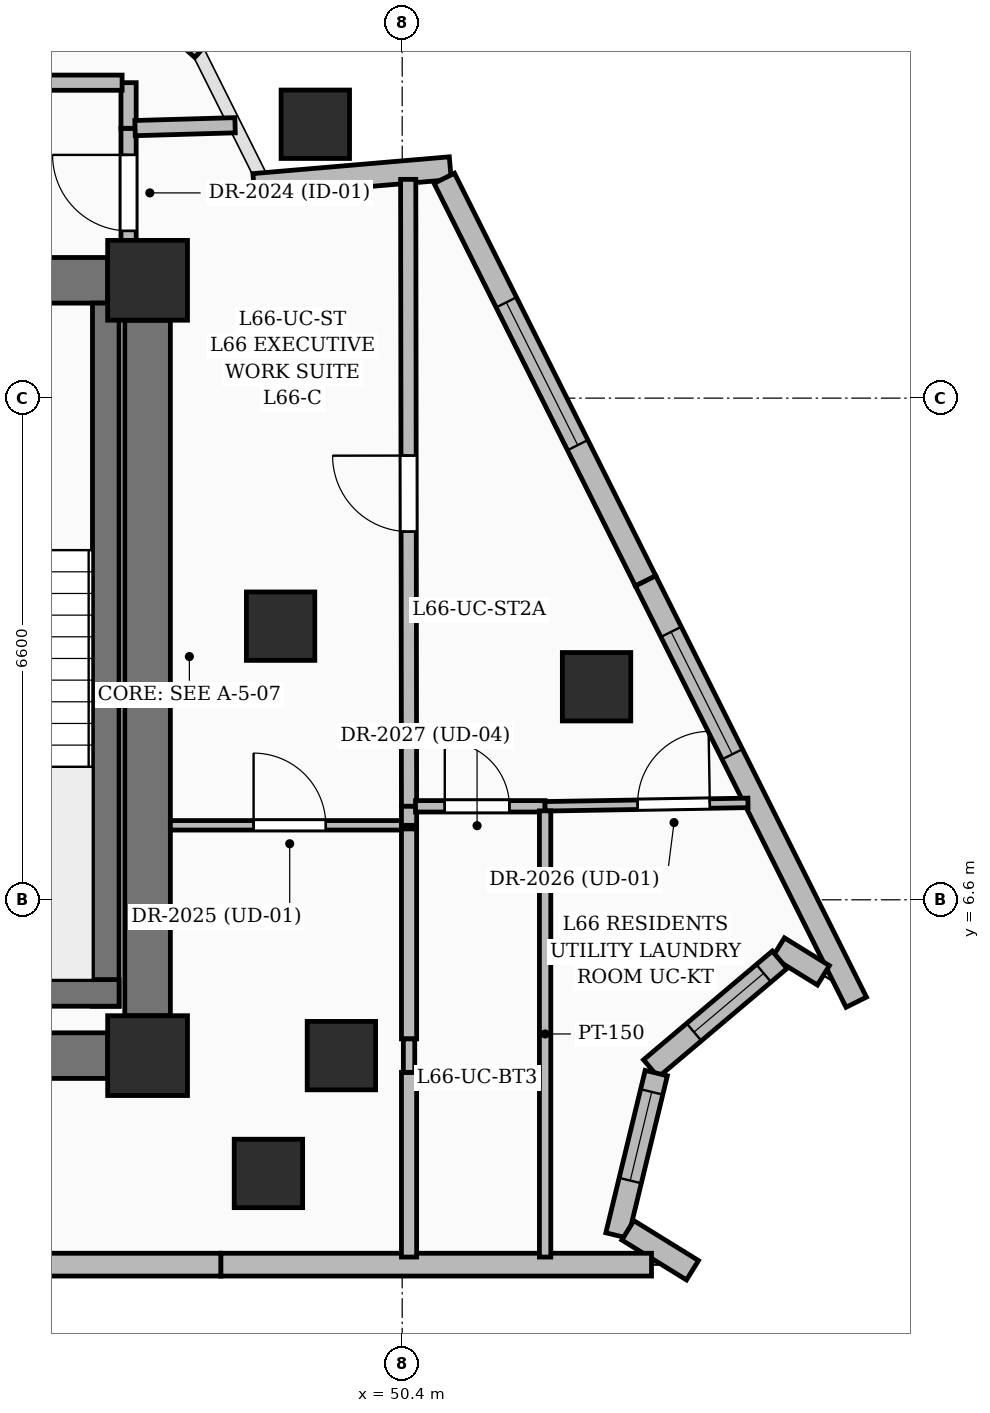
"""IFC4 building model, lengths in metres.
Left out: names, types, materials, properties, quantities, classifications, styles, units other than length and angle.
Written with IfcOpenShell. Run it as: python <this file> out.ifc"""

import sys

from ifc_helpers import new_model, si_unit, direction, frame, frame_2d, origin, origin_2d, place, context, subcontext, project, spatial, rectangle, extrude, element, fill, save


model = new_model("IFC4")
c1 = context("Model", 3, precision=1e-05, world=origin(), true_north=direction((0.0, 1.0)))
c2 = subcontext(c1, "Body", "Model", "MODEL_VIEW")
j1 = project(units=[si_unit("LENGTHUNIT", "METRE"), si_unit("PLANEANGLEUNIT", "RADIAN")], contexts=[c1])
p1 = place(None, origin())
s1 = spatial("IfcSite", under=j1, at=p1, CompositionType="ELEMENT")
p2 = place(p1, origin())
s2 = spatial("IfcBuilding", under=s1, at=p2, CompositionType="ELEMENT")
p3 = place(p2, frame((0.0, 0.0, 255.75)))
s3 = spatial("IfcBuildingStorey", under=s2, at=p3, CompositionType="ELEMENT", Elevation=255.75)
for number, where, z_axis, x_axis in (
    (1, (47.05, 4.55, 0.0), (0.0, 0.0, 1.0), (1.0, 0.0, 0.0)),
    (2, (47.05, 14.75, 0.0), (0.0, 0.0, 1.0), (1.0, 0.0, 0.0)),
):
    element("IfcColumn", number, at=place(p3, frame(where, z_axis=z_axis, x_axis=x_axis)), inside=s3, PredefinedType="COLUMN", context=c2, shape_type="SweptSolid", body=[
        extrude(rectangle(XDim=1.05, YDim=1.05, at=origin_2d()), origin(), (0.0, 0.0, 1.0), 3.75),
    ])
for number, where, z_axis, x_axis in (
    (3, (49.6, 4.55, 0.0), (0.0, 0.0, 1.0), (1.0, 0.0, 0.0)),
    (4, (48.8, 10.2, 0.0), (0.0, 0.0, 1.0), (1.0, 0.0, 0.0)),
):
    element("IfcColumn", number, at=place(p3, frame(where, z_axis=z_axis, x_axis=x_axis)), inside=s3, PredefinedType="COLUMN", context=c2, shape_type="SweptSolid", body=[
        extrude(rectangle(XDim=0.9, YDim=0.9, at=origin_2d()), origin(), (0.0, 0.0, 1.0), 3.75),
    ])
p4 = place(p3, frame((35.675, 4.55, 0.0), z_axis=(0.0, 0.0, 1.0), x_axis=(1.0, 0.0, 0.0)))
e5 = element("IfcWall", 5, at=p4, inside=s3, PredefinedType="SHEAR", context=c2, shape_type="SweptSolid", body=[
    extrude(rectangle(XDim=10.85, YDim=0.6, at=frame_2d((5.425, 0.0))), origin(), (0.0, 0.0, 1.0), 3.75),
])
p5 = place(p3, frame((35.675, 14.75, 0.0), z_axis=(0.0, 0.0, 1.0), x_axis=(1.0, 0.0, 0.0)))
e6 = element("IfcWall", 6, at=p5, inside=s3, PredefinedType="SHEAR", context=c2, shape_type="SweptSolid", body=[
    extrude(rectangle(XDim=10.85, YDim=0.6, at=frame_2d((5.425, 0.0))), origin(), (0.0, 0.0, 1.0), 3.75),
])
p6 = place(p5, frame((1.1, 0.0, 0.0)))
e7 = element("IfcOpeningElement", 7, at=p6, cuts=e6, PredefinedType="OPENING", context=c2, shape_type="SweptSolid", body=[
    extrude(rectangle(XDim=1.05, YDim=2.15, at=frame_2d((0.525, 1.075))), frame((0.0, 0.31, 0.0), z_axis=(0.0, -1.0, 0.0), x_axis=(1.0, 0.0, 0.0)), (0.0, 0.0, 1.0), 0.62),
])
p7 = place(p5, frame((8.7, 0.0, 0.0)))
e8 = element("IfcOpeningElement", 8, at=p7, cuts=e6, PredefinedType="OPENING", context=c2, shape_type="SweptSolid", body=[
    extrude(rectangle(XDim=1.05, YDim=2.15, at=frame_2d((0.525, 1.075))), frame((0.0, 0.31, 0.0), z_axis=(0.0, -1.0, 0.0), x_axis=(1.0, 0.0, 0.0)), (0.0, 0.0, 1.0), 0.62),
])
p8 = place(p5, frame((3.825, 0.0, 0.0)))
e9 = element("IfcOpeningElement", 9, at=p8, cuts=e6, PredefinedType="OPENING", context=c2, shape_type="SweptSolid", body=[
    extrude(rectangle(XDim=1.2, YDim=2.2, at=frame_2d((0.6, 1.1))), frame((0.0, 0.31, 0.0), z_axis=(0.0, -1.0, 0.0), x_axis=(1.0, 0.0, 0.0)), (0.0, 0.0, 1.0), 0.62),
])
p9 = place(p5, frame((5.825, 0.0, 0.0)))
e10 = element("IfcOpeningElement", 10, at=p9, cuts=e6, PredefinedType="OPENING", context=c2, shape_type="SweptSolid", body=[
    extrude(rectangle(XDim=1.2, YDim=2.2, at=frame_2d((0.6, 1.1))), frame((0.0, 0.31, 0.0), z_axis=(0.0, -1.0, 0.0), x_axis=(1.0, 0.0, 0.0)), (0.0, 0.0, 1.0), 0.62),
])
p10 = place(p3, frame((47.05, 5.075, 0.0), z_axis=(0.0, 0.0, 1.0), x_axis=(0.0, 1.0, 0.0)))
e11 = element("IfcWall", 11, at=p10, inside=s3, PredefinedType="SHEAR", context=c2, shape_type="SweptSolid", body=[
    extrude(rectangle(XDim=9.15, YDim=0.6, at=frame_2d((4.575, 0.0))), origin(), (0.0, 0.0, 1.0), 3.75),
])
p11 = place(p3, frame((46.5, 5.2, 0.0), z_axis=(0.0, 0.0, 1.0), x_axis=(0.0, 1.0, 0.0)))
e12 = element("IfcWall", 12, at=p11, inside=s3, PredefinedType="SOLIDWALL", context=c2, shape_type="SweptSolid", body=[
    extrude(rectangle(XDim=9.25, YDim=0.35, at=frame_2d((4.625, 0.0))), origin(), (0.0, 0.0, 1.0), 3.75),
])
p12 = place(p3, frame((43.125, 5.375, 0.0), z_axis=(0.0, 0.0, 1.0), x_axis=(1.0, 0.0, 0.0)))
e13 = element("IfcWall", 13, at=p12, inside=s3, PredefinedType="SOLIDWALL", context=c2, shape_type="SweptSolid", body=[
    extrude(rectangle(XDim=3.55, YDim=0.35, at=frame_2d((1.775, 0.0))), origin(), (0.0, 0.0, 1.0), 3.75),
])
for number, where, z_axis, x_axis in (
    (14, (48.64, 3.0, 0.0), (0.0, 0.0, 1.0), (1.0, 0.0, 0.0)),
    (15, (52.957, 9.403, 0.0), (0.0, 0.0, 1.0), (1.0, 0.0, 0.0)),
    (16, (49.257, 16.803, 0.0), (0.0, 0.0, 1.0), (1.0, 0.0, 0.0)),
):
    element("IfcColumn", number, at=place(p3, frame(where, z_axis=z_axis, x_axis=x_axis)), inside=s3, PredefinedType="COLUMN", context=c2, shape_type="SweptSolid", body=[
        extrude(rectangle(XDim=0.9, YDim=0.9, at=origin_2d()), origin(), (0.0, 0.0, 1.0), 3.75),
    ])
p13 = place(p3, frame((49.101, 19.508, 0.0), z_axis=(0.0, 0.0, 1.0), x_axis=(-0.665927695229, -0.746016289854, 0.0)))
e17 = element("IfcWall", 17, at=p13, inside=s3, PredefinedType="SOLIDWALL", context=c2, shape_type="SweptSolid", body=[
    extrude(rectangle(XDim=2.314, YDim=0.3, at=frame_2d((1.157, 0.0))), origin(), (0.0, 0.0, 1.0), 2.825),
])
p14 = place(p13, frame((0.788, 0.0, 0.8)))
e18 = element("IfcOpeningElement", 18, at=p14, cuts=e17, PredefinedType="OPENING", context=c2, shape_type="SweptSolid", body=[
    extrude(rectangle(XDim=1.2, YDim=1.8, at=frame_2d((0.6, 0.9))), frame((0.0, 0.16, 0.0), z_axis=(0.0, -1.0, 0.0), x_axis=(1.0, 0.0, 0.0)), (0.0, 0.0, 1.0), 0.32),
])
p15 = place(p3, frame((48.448, 16.004, 0.0), z_axis=(0.0, 0.0, 1.0), x_axis=(0.996372236954, 0.085102088266, 0.0)))
e19 = element("IfcWall", 19, at=p15, inside=s3, PredefinedType="SOLIDWALL", context=c2, shape_type="SweptSolid", body=[
    extrude(rectangle(XDim=2.594, YDim=0.3, at=frame_2d((1.297, 0.0))), origin(), (0.0, 0.0, 1.0), 2.769),
])
p16 = place(p3, frame((50.953, 16.092, 0.0), z_axis=(0.0, 0.0, 1.0), x_axis=(0.447246574942, -0.894410700519, 0.0)))
e20 = element("IfcWall", 20, at=p16, inside=s3, PredefinedType="SOLIDWALL", context=c2, shape_type="SweptSolid", body=[
    extrude(rectangle(XDim=5.922, YDim=0.3, at=frame_2d((2.961, 0.0))), origin(), (0.0, 0.0, 1.0), 3.5),
])
p17 = place(p16, frame((1.825, 0.0, 0.55)))
e21 = element("IfcOpeningElement", 21, at=p17, cuts=e20, PredefinedType="OPENING", context=c2, shape_type="SweptSolid", body=[
    extrude(rectangle(XDim=2.1, YDim=2.4, at=frame_2d((1.05, 1.2))), frame((0.0, 0.16, 0.0), z_axis=(0.0, -1.0, 0.0), x_axis=(1.0, 0.0, 0.0)), (0.0, 0.0, 1.0), 0.32),
])
p18 = place(p3, frame((53.602, 10.795, 0.0), z_axis=(0.0, 0.0, 1.0), x_axis=(0.447229354041, -0.894419311556, 0.0)))
e22 = element("IfcWall", 22, at=p18, inside=s3, PredefinedType="SOLIDWALL", context=c2, shape_type="SweptSolid", body=[
    extrude(rectangle(XDim=6.197, YDim=0.3, at=frame_2d((3.099, 0.0))), origin(), (0.0, 0.0, 1.0), 3.5),
])
p19 = place(p18, frame((0.75, 0.0, 0.6)))
e23 = element("IfcOpeningElement", 23, at=p19, cuts=e22, PredefinedType="OPENING", context=c2, shape_type="SweptSolid", body=[
    extrude(rectangle(XDim=1.8, YDim=2.1, at=frame_2d((0.9, 1.05))), frame((0.0, 0.16, 0.0), z_axis=(0.0, -1.0, 0.0), x_axis=(1.0, 0.0, 0.0)), (0.0, 0.0, 1.0), 0.32),
])
p20 = place(p3, frame((55.941, 5.607, 0.0), z_axis=(0.0, 0.0, 1.0), x_axis=(-0.850848828595, 0.525410573626, 0.0)))
e24 = element("IfcWall", 24, at=p20, inside=s3, PredefinedType="SOLIDWALL", context=c2, shape_type="SweptSolid", body=[
    extrude(rectangle(XDim=0.695, YDim=0.3, at=frame_2d((0.347, 0.0))), origin(), (0.0, 0.0, 1.0), 3.5),
])
p21 = place(p3, frame((55.366, 5.811, 0.0), z_axis=(0.0, 0.0, 1.0), x_axis=(-0.764070930708, -0.645132244464, 0.0)))
e25 = element("IfcWall", 25, at=p21, inside=s3, PredefinedType="SOLIDWALL", context=c2, shape_type="SweptSolid", body=[
    extrude(rectangle(XDim=2.217, YDim=0.3, at=frame_2d((1.108, 0.0))), origin(), (0.0, 0.0, 1.0), 3.5),
])
p22 = place(p21, frame((0.275, 0.0, 0.8)))
e26 = element("IfcOpeningElement", 26, at=p22, cuts=e25, PredefinedType="OPENING", context=c2, shape_type="SweptSolid", body=[
    extrude(rectangle(XDim=1.2, YDim=1.8, at=frame_2d((0.6, 0.9))), frame((0.0, 0.16, 0.0), z_axis=(0.0, -1.0, 0.0), x_axis=(1.0, 0.0, 0.0)), (0.0, 0.0, 1.0), 0.32),
])
p23 = place(p3, frame((53.742, 4.32, 0.0), z_axis=(0.0, 0.0, 1.0), x_axis=(-0.235342539944, -0.971912490347, 0.0)))
e27 = element("IfcWall", 27, at=p23, inside=s3, PredefinedType="SOLIDWALL", context=c2, shape_type="SweptSolid", body=[
    extrude(rectangle(XDim=2.198, YDim=0.3, at=frame_2d((1.099, 0.0))), origin(), (0.0, 0.0, 1.0), 3.5),
])
p24 = place(p23, frame((0.255, 0.0, 0.8)))
e28 = element("IfcOpeningElement", 28, at=p24, cuts=e27, PredefinedType="OPENING", context=c2, shape_type="SweptSolid", body=[
    extrude(rectangle(XDim=1.2, YDim=1.8, at=frame_2d((0.6, 0.9))), frame((0.0, 0.16, 0.0), z_axis=(0.0, -1.0, 0.0), x_axis=(1.0, 0.0, 0.0)), (0.0, 0.0, 1.0), 0.32),
])
p25 = place(p3, frame((53.369, 2.252, 0.0), z_axis=(0.0, 0.0, 1.0), x_axis=(0.85071769282, -0.52562287538, 0.0)))
e29 = element("IfcWall", 29, at=p25, inside=s3, PredefinedType="SOLIDWALL", context=c2, shape_type="SweptSolid", body=[
    extrude(rectangle(XDim=1.0, YDim=0.3, at=frame_2d((0.5, 0.0))), origin(), (0.0, 0.0, 1.0), 3.5),
])
p26 = place(p3, frame((53.68, 1.8, 0.0), z_axis=(0.0, 0.0, 1.0), x_axis=(-1.0, 0.0, 0.0)))
e30 = element("IfcWall", 30, at=p26, inside=s3, PredefinedType="SOLIDWALL", context=c2, shape_type="SweptSolid", body=[
    extrude(rectangle(XDim=5.667, YDim=0.3, at=frame_2d((2.833, 0.0))), origin(), (0.0, 0.0, 1.0), 3.5),
])
p27 = place(p3, frame((48.013, 1.8, 0.0), z_axis=(0.0, 0.0, 1.0), x_axis=(-1.0, 0.0, 0.0)))
e31 = element("IfcWall", 31, at=p27, inside=s3, PredefinedType="SOLIDWALL", context=c2, shape_type="SweptSolid", body=[
    extrude(rectangle(XDim=6.227, YDim=0.3, at=frame_2d((3.113, 0.0))), origin(), (0.0, 0.0, 1.0), 3.5),
])
p28 = place(p27, frame((2.25, 0.0, 0.6)))
e32 = element("IfcOpeningElement", 32, at=p28, cuts=e31, PredefinedType="OPENING", context=c2, shape_type="SweptSolid", body=[
    extrude(rectangle(XDim=1.8, YDim=2.1, at=frame_2d((0.9, 1.05))), frame((0.0, 0.16, 0.0), z_axis=(0.0, -1.0, 0.0), x_axis=(1.0, 0.0, 0.0)), (0.0, 0.0, 1.0), 0.32),
])
p29 = place(p3, frame((46.8, 15.05, 0.0), z_axis=(0.0, 0.0, 1.0), x_axis=(0.0, 1.0, 0.0)))
e33 = element("IfcWall", 33, at=p29, inside=s3, PredefinedType="PARTITIONING", context=c2, shape_type="SweptSolid", body=[
    extrude(rectangle(XDim=1.7, YDim=0.2, at=frame_2d((0.85, 0.0))), origin(), (0.0, 0.0, 1.0), 2.685),
])
p30 = place(p29, frame((0.35, 0.0, 0.0)))
e34 = element("IfcOpeningElement", 34, at=p30, cuts=e33, PredefinedType="OPENING", context=c2, shape_type="SweptSolid", body=[
    extrude(rectangle(XDim=1.0, YDim=2.2, at=frame_2d((0.5, 1.1))), frame((0.0, 0.11, 0.0), z_axis=(0.0, -1.0, 0.0), x_axis=(1.0, 0.0, 0.0)), (0.0, 0.0, 1.0), 0.22),
])
p31 = place(p3, frame((46.8, 16.75, 0.0), z_axis=(0.0, 0.0, 1.0), x_axis=(0.0, 1.0, 0.0)))
e35 = element("IfcWall", 35, at=p31, inside=s3, PredefinedType="PARTITIONING", context=c2, shape_type="SweptSolid", body=[
    extrude(rectangle(XDim=0.6, YDim=0.2, at=frame_2d((0.3, 0.0))), origin(), (0.0, 0.0, 1.0), 3.5),
])
p32 = place(p3, frame((46.715, 17.35, 0.0), z_axis=(0.0, 0.0, 1.0), x_axis=(-1.0, 0.0, 0.0)))
e36 = element("IfcWall", 36, at=p32, inside=s3, PredefinedType="PARTITIONING", context=c2, shape_type="SweptSolid", body=[
    extrude(rectangle(XDim=3.865, YDim=0.2, at=frame_2d((1.933, 0.0))), origin(), (0.0, 0.0, 1.0), 2.685),
])
p33 = place(p32, frame((1.332, 0.0, 0.0)))
e37 = element("IfcOpeningElement", 37, at=p33, cuts=e36, PredefinedType="OPENING", context=c2, shape_type="SweptSolid", body=[
    extrude(rectangle(XDim=1.0, YDim=2.2, at=frame_2d((0.5, 1.1))), frame((0.0, 0.11, 0.0), z_axis=(0.0, -1.0, 0.0), x_axis=(1.0, 0.0, 0.0)), (0.0, 0.0, 1.0), 0.22),
])
p34 = place(p3, frame((47.35, 7.58, 0.0), z_axis=(0.0, 0.0, 1.0), x_axis=(1.0, 0.0, 0.0)))
e38 = element("IfcWall", 38, at=p34, inside=s3, PredefinedType="PARTITIONING", context=c2, shape_type="SweptSolid", body=[
    extrude(rectangle(XDim=3.14, YDim=0.125, at=frame_2d((1.57, 0.0))), origin(), (0.0, 0.0, 1.0), 2.685),
])
p35 = place(p34, frame((1.095, 0.0, 0.0)))
e39 = element("IfcOpeningElement", 39, at=p35, cuts=e38, PredefinedType="OPENING", context=c2, shape_type="SweptSolid", body=[
    extrude(rectangle(XDim=0.95, YDim=2.2, at=frame_2d((0.475, 1.1))), frame((0.0, 0.072, 0.0), z_axis=(0.0, -1.0, 0.0), x_axis=(1.0, 0.0, 0.0)), (0.0, 0.0, 1.0), 0.145),
])
p36 = place(p3, frame((50.49, 7.83, 0.0), z_axis=(0.0, 0.0, 1.0), x_axis=(-0.001332029721, 0.999999112848, 0.0)))
e40 = element("IfcWall", 40, at=p36, inside=s3, PredefinedType="PARTITIONING", context=c2, shape_type="SweptSolid", body=[
    extrude(rectangle(XDim=8.248, YDim=0.2, at=frame_2d((4.124, 0.0))), origin(), (0.0, 0.0, 1.0), 2.764),
])
p37 = place(p36, frame((3.614, 0.0, 0.0)))
e41 = element("IfcOpeningElement", 41, at=p37, cuts=e40, PredefinedType="OPENING", context=c2, shape_type="SweptSolid", body=[
    extrude(rectangle(XDim=1.0, YDim=2.2, at=frame_2d((0.5, 1.1))), frame((0.0, 0.11, 0.0), z_axis=(0.0, -1.0, 0.0), x_axis=(1.0, 0.0, 0.0)), (0.0, 0.0, 1.0), 0.22),
])
p38 = place(p3, frame((50.49, 7.58, 0.0), z_axis=(0.0, 0.0, 1.0), x_axis=(0.0, 1.0, 0.0)))
e42 = element("IfcWall", 42, at=p38, inside=s3, PredefinedType="PARTITIONING", context=c2, shape_type="SweptSolid", body=[
    extrude(rectangle(XDim=0.25, YDim=0.2, at=frame_2d((0.125, 0.0))), origin(), (0.0, 0.0, 1.0), 3.5),
])
p39 = place(p3, frame((48.201, 16.79, 0.0), z_axis=(0.0, 0.0, 1.0), x_axis=(-0.999592086461, -0.028559773899, 0.0)))
e43 = element("IfcWall", 43, at=p39, inside=s3, PredefinedType="PARTITIONING", context=c2, shape_type="SweptSolid", body=[
    extrude(rectangle(XDim=1.316, YDim=0.2, at=frame_2d((0.658, 0.0))), origin(), (0.0, 0.0, 1.0), 3.5),
])
p40 = place(p3, frame((50.49, 1.9, 0.0), z_axis=(0.0, 0.0, 1.0), x_axis=(0.0, 1.0, 0.0)))
e44 = element("IfcWall", 44, at=p40, inside=s3, PredefinedType="PARTITIONING", context=c2, shape_type="SweptSolid", body=[
    extrude(rectangle(XDim=2.43, YDim=0.2, at=frame_2d((1.215, 0.0))), origin(), (0.0, 0.0, 1.0), 3.5),
])
p41 = place(p3, frame((50.49, 4.77, 0.0), z_axis=(0.0, 0.0, 1.0), x_axis=(0.0, 1.0, 0.0)))
e45 = element("IfcWall", 45, at=p41, inside=s3, PredefinedType="PARTITIONING", context=c2, shape_type="SweptSolid", body=[
    extrude(rectangle(XDim=2.762, YDim=0.2, at=frame_2d((1.381, 0.0))), origin(), (0.0, 0.0, 1.0), 2.82),
])
p42 = place(p3, frame((50.575, 7.83, 0.0), z_axis=(0.0, 0.0, 1.0), x_axis=(1.0, 0.0, 0.0)))
e46 = element("IfcWall", 46, at=p42, inside=s3, PredefinedType="PARTITIONING", context=c2, shape_type="SweptSolid", body=[
    extrude(rectangle(XDim=1.705, YDim=0.15, at=frame_2d((0.853, 0.0))), origin(), (0.0, 0.0, 1.0), 2.82),
])
p43 = place(p42, frame((0.385, 0.0, 0.0)))
e47 = element("IfcOpeningElement", 47, at=p43, cuts=e46, PredefinedType="OPENING", context=c2, shape_type="SweptSolid", body=[
    extrude(rectangle(XDim=0.85, YDim=2.1, at=frame_2d((0.425, 1.05))), frame((0.0, 0.085, 0.0), z_axis=(0.0, -1.0, 0.0), x_axis=(1.0, 0.0, 0.0)), (0.0, 0.0, 1.0), 0.17),
])
p44 = place(p3, frame((52.28, 7.83, 0.0), z_axis=(0.0, 0.0, 1.0), x_axis=(0.999858383407, 0.016828937298, 0.0)))
e48 = element("IfcWall", 48, at=p44, inside=s3, PredefinedType="PARTITIONING", context=c2, shape_type="SweptSolid", body=[
    extrude(rectangle(XDim=2.669, YDim=0.125, at=frame_2d((1.335, 0.0))), origin(), (0.0, 0.0, 1.0), 3.5),
])
p45 = place(p44, frame((1.217, 0.0, 0.0)))
e49 = element("IfcOpeningElement", 49, at=p45, cuts=e48, PredefinedType="OPENING", context=c2, shape_type="SweptSolid", body=[
    extrude(rectangle(XDim=0.95, YDim=2.2, at=frame_2d((0.475, 1.1))), frame((0.0, 0.072, 0.0), z_axis=(0.0, -1.0, 0.0), x_axis=(1.0, 0.0, 0.0)), (0.0, 0.0, 1.0), 0.145),
])
p46 = place(p3, frame((52.28, 1.9, 0.0), z_axis=(0.0, 0.0, 1.0), x_axis=(0.0, 1.0, 0.0)))
e50 = element("IfcWall", 50, at=p46, inside=s3, PredefinedType="PARTITIONING", context=c2, shape_type="SweptSolid", body=[
    extrude(rectangle(XDim=5.87, YDim=0.15, at=frame_2d((2.935, 0.0))), origin(), (0.0, 0.0, 1.0), 3.5),
])
p47 = place(p3, frame((50.49, 4.77, 0.0), z_axis=(0.0, 0.0, 1.0), x_axis=(0.0, -1.0, 0.0)))
e51 = element("IfcWall", 51, at=p47, inside=s3, PredefinedType="PARTITIONING", context=c2, shape_type="SweptSolid", body=[
    extrude(rectangle(XDim=0.44, YDim=0.15, at=frame_2d((0.22, 0.0))), origin(), (0.0, 0.0, 1.0), 3.5),
])
p48 = place(p17, origin())
e52 = element("IfcWindow", 52, at=p48, inside=s3, PartitioningType="SINGLE_PANEL", PredefinedType="WINDOW", context=c2, shape_type="SweptSolid", body=[
    extrude(rectangle(XDim=2.1, YDim=2.4, at=frame_2d((1.05, 1.2))), frame((0.0, 0.03, 0.0), z_axis=(0.0, -1.0, 0.0), x_axis=(1.0, 0.0, 0.0)), (0.0, 0.0, 1.0), 0.06),
])
fill(e21, e52)
p49 = place(p19, origin())
e53 = element("IfcWindow", 53, at=p49, inside=s3, PartitioningType="SINGLE_PANEL", PredefinedType="WINDOW", context=c2, shape_type="SweptSolid", body=[
    extrude(rectangle(XDim=1.8, YDim=2.1, at=frame_2d((0.9, 1.05))), frame((0.0, 0.03, 0.0), z_axis=(0.0, -1.0, 0.0), x_axis=(1.0, 0.0, 0.0)), (0.0, 0.0, 1.0), 0.06),
])
fill(e23, e53)
p50 = place(p22, origin())
e54 = element("IfcWindow", 54, at=p50, inside=s3, PartitioningType="SINGLE_PANEL", PredefinedType="WINDOW", context=c2, shape_type="SweptSolid", body=[
    extrude(rectangle(XDim=1.2, YDim=1.8, at=frame_2d((0.6, 0.9))), frame((0.0, 0.03, 0.0), z_axis=(0.0, -1.0, 0.0), x_axis=(1.0, 0.0, 0.0)), (0.0, 0.0, 1.0), 0.06),
])
fill(e26, e54)
p51 = place(p24, origin())
e55 = element("IfcWindow", 55, at=p51, inside=s3, PartitioningType="SINGLE_PANEL", PredefinedType="WINDOW", context=c2, shape_type="SweptSolid", body=[
    extrude(rectangle(XDim=1.2, YDim=1.8, at=frame_2d((0.6, 0.9))), frame((0.0, 0.03, 0.0), z_axis=(0.0, -1.0, 0.0), x_axis=(1.0, 0.0, 0.0)), (0.0, 0.0, 1.0), 0.06),
])
fill(e28, e55)
p52 = place(p30, origin())
e56 = element("IfcDoor", 56, at=p52, inside=s3, OperationType="SINGLE_SWING_RIGHT", PredefinedType="DOOR", context=c2, shape_type="SweptSolid", body=[
    extrude(rectangle(XDim=1.0, YDim=2.2, at=frame_2d((0.5, 1.1))), frame((0.0, 0.025, 0.0), z_axis=(0.0, -1.0, 0.0), x_axis=(1.0, 0.0, 0.0)), (0.0, 0.0, 1.0), 0.05),
])
fill(e34, e56)
p53 = place(p35, origin())
e57 = element("IfcDoor", 57, at=p53, inside=s3, OperationType="SINGLE_SWING_LEFT", PredefinedType="DOOR", context=c2, shape_type="SweptSolid", body=[
    extrude(rectangle(XDim=0.95, YDim=2.2, at=frame_2d((0.475, 1.1))), frame((0.0, 0.025, 0.0), z_axis=(0.0, -1.0, 0.0), x_axis=(1.0, 0.0, 0.0)), (0.0, 0.0, 1.0), 0.05),
])
fill(e39, e57)
p54 = place(p45, origin())
e58 = element("IfcDoor", 58, at=p54, inside=s3, OperationType="SINGLE_SWING_RIGHT", PredefinedType="DOOR", context=c2, shape_type="SweptSolid", body=[
    extrude(rectangle(XDim=0.95, YDim=2.2, at=frame_2d((0.475, 1.1))), frame((0.0, 0.025, 0.0), z_axis=(0.0, -1.0, 0.0), x_axis=(1.0, 0.0, 0.0)), (0.0, 0.0, 1.0), 0.05),
])
fill(e49, e58)
p55 = place(p43, origin())
e59 = element("IfcDoor", 59, at=p55, inside=s3, OperationType="SINGLE_SWING_LEFT", PredefinedType="DOOR", context=c2, shape_type="SweptSolid", body=[
    extrude(rectangle(XDim=0.85, YDim=2.1, at=frame_2d((0.425, 1.05))), frame((0.0, 0.025, 0.0), z_axis=(0.0, -1.0, 0.0), x_axis=(1.0, 0.0, 0.0)), (0.0, 0.0, 1.0), 0.05),
])
fill(e47, e59)
p56 = place(p37, origin())
e60 = element("IfcDoor", 60, at=p56, inside=s3, OperationType="SINGLE_SWING_RIGHT", PredefinedType="DOOR", context=c2, shape_type="SweptSolid", body=[
    extrude(rectangle(XDim=1.0, YDim=2.2, at=frame_2d((0.5, 1.1))), frame((0.0, 0.025, 0.0), z_axis=(0.0, -1.0, 0.0), x_axis=(1.0, 0.0, 0.0)), (0.0, 0.0, 1.0), 0.05),
])
fill(e41, e60)
save(model, sys.argv[1])
